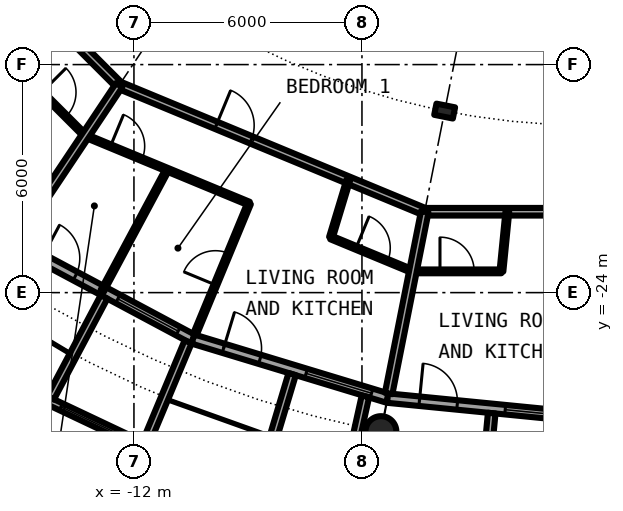
"""IFC4 building model, lengths in metres.
Left out: names, types, materials, properties, quantities, classifications, styles, units other than length and angle.
Written with IfcOpenShell. Run it as: python <this file> out.ifc"""

import sys

from ifc_helpers import new_model, si_unit, direction, frame, frame_2d, origin, origin_2d, place, context, subcontext, project, spatial, rectangle, circle, hollow_circle, i_section, extrude, element, fill, save


model = new_model("IFC4")
c1 = context("Model", 3, precision=1e-05, world=origin(), true_north=direction((0.0, 1.0)))
c2 = subcontext(c1, "Body", "Model", "MODEL_VIEW")
j1 = project(units=[si_unit("LENGTHUNIT", "METRE"), si_unit("PLANEANGLEUNIT", "RADIAN")], contexts=[c1])
p1 = place(None, origin())
s1 = spatial("IfcSite", under=j1, at=p1, CompositionType="ELEMENT")
p2 = place(p1, origin())
s2 = spatial("IfcBuilding", under=s1, at=p2, CompositionType="ELEMENT")
p3 = place(p2, frame((0.0, 0.0, 170.75)))
s3 = spatial("IfcBuildingStorey", under=s2, at=p3, CompositionType="ELEMENT", Elevation=170.75)
p4 = place(p3, frame((-5.501, -27.658, 0.0), z_axis=(0.0, 0.0, 1.0), x_axis=(1.0, 0.0, 0.0)))
e1 = element("IfcColumn", 1, at=p4, inside=s3, PredefinedType="COLUMN", context=c2, shape_type="SweptSolid", body=[
    extrude(hollow_circle(Radius=0.406, WallThickness=0.04, at=origin_2d()), origin(), (0.0, 0.0, 1.0), 3.05),
])
p5 = place(p3, frame((-3.824, -19.223, 0.0), z_axis=(0.0, 0.0, 1.0), x_axis=(-0.195090322016, -0.980785280403, 0.0)))
e2 = element("IfcColumn", 2, at=p5, inside=s3, PredefinedType="COLUMN", context=c2, shape_type="SweptSolid", body=[
    extrude(i_section(OverallWidth=0.3, OverallDepth=0.5, WebThickness=0.014, FlangeThickness=0.028, FilletRadius=0.027, at=origin_2d()), origin(), (0.0, 0.0, 1.0), 3.05),
])
p6 = place(p3, frame((-15.167, -22.699, 0.0), z_axis=(0.0, 0.0, 1.0), x_axis=(0.881915646801, -0.471407246368, 0.0)))
e3 = element("IfcWall", 3, at=p6, inside=s3, PredefinedType="SOLIDWALL", context=c2, shape_type="SweptSolid", body=[
    extrude(rectangle(XDim=5.352, YDim=0.25, at=frame_2d((2.676, 0.0))), origin(), (0.0, 0.0, 1.0), 2.7),
])
p7 = place(p6, frame((0.841, 0.0, 0.0)))
e4 = element("IfcOpeningElement", 4, at=p7, cuts=e3, PredefinedType="OPENING", context=c2, shape_type="SweptSolid", body=[
    extrude(rectangle(XDim=1.0, YDim=2.2, at=frame_2d((0.5, 1.1))), frame((0.0, 0.135, 0.0), z_axis=(0.0, -1.0, 0.0), x_axis=(1.0, 0.0, 0.0)), (0.0, 0.0, 1.0), 0.27),
])
p8 = place(p6, frame((3.111, 0.0, 0.3)))
e5 = element("IfcOpeningElement", 5, at=p8, cuts=e3, PredefinedType="OPENING", context=c2, shape_type="SweptSolid", body=[
    extrude(rectangle(XDim=1.8, YDim=2.1, at=frame_2d((0.9, 1.05))), frame((0.0, 0.135, 0.0), z_axis=(0.0, -1.0, 0.0), x_axis=(1.0, 0.0, 0.0)), (0.0, 0.0, 1.0), 0.27),
])
p9 = place(p3, frame((-14.335, -26.808, -0.03), z_axis=(0.0, 0.0, 1.0), x_axis=(0.904000060331, -0.427532327342, 0.0)))
e6 = element("IfcWall", 6, at=p9, inside=s3, PredefinedType="SOLIDWALL", context=c2, shape_type="SweptSolid", body=[
    extrude(rectangle(XDim=2.993, YDim=0.2, at=frame_2d((1.497, 0.0))), origin(), (0.0, 0.0, 1.0), 2.73),
])
p10 = place(p9, frame((0.457, 0.0, 0.33)))
e7 = element("IfcOpeningElement", 7, at=p10, cuts=e6, PredefinedType="OPENING", context=c2, shape_type="SweptSolid", body=[
    extrude(circle(Radius=1.04, at=frame_2d((1.04, 1.04))), frame((0.0, 0.11, 0.0), z_axis=(0.0, -1.0, 0.0), x_axis=(1.0, 0.0, 0.0)), (0.0, 0.0, 1.0), 0.22),
])
p11 = place(p3, frame((-12.787, -24.113, -0.03), z_axis=(0.0, 0.0, 1.0), x_axis=(-0.468365282436, -0.883534924159, 0.0)))
e8 = element("IfcWall", 8, at=p11, inside=s3, PredefinedType="SOLIDWALL", context=c2, shape_type="SweptSolid", body=[
    extrude(rectangle(XDim=3.006, YDim=0.2, at=frame_2d((1.503, 0.0))), origin(), (0.0, 0.0, 1.0), 2.73),
])
p12 = place(p3, frame((-10.575, -25.295, -0.03), z_axis=(0.0, 0.0, 1.0), x_axis=(-0.385697364644, -0.922625353492, 0.0)))
e9 = element("IfcWall", 9, at=p12, inside=s3, PredefinedType="SOLIDWALL", context=c2, shape_type="SweptSolid", body=[
    extrude(rectangle(XDim=2.883, YDim=0.2, at=frame_2d((1.442, 0.0))), origin(), (0.0, 0.0, 1.0), 2.73),
])
p13 = place(p3, frame((-10.447, -25.222, 0.0), z_axis=(0.0, 0.0, 1.0), x_axis=(0.956965678721, -0.290201119486, 0.0)))
e10 = element("IfcWall", 10, at=p13, inside=s3, PredefinedType="SOLIDWALL", context=c2, shape_type="SweptSolid", body=[
    extrude(rectangle(XDim=5.351, YDim=0.25, at=frame_2d((2.676, 0.0))), origin(), (0.0, 0.0, 1.0), 2.7),
])
p14 = place(p13, frame((0.841, 0.0, 0.0)))
e11 = element("IfcOpeningElement", 11, at=p14, cuts=e10, PredefinedType="OPENING", context=c2, shape_type="SweptSolid", body=[
    extrude(rectangle(XDim=1.0, YDim=2.2, at=frame_2d((0.5, 1.1))), frame((0.0, 0.135, 0.0), z_axis=(0.0, -1.0, 0.0), x_axis=(1.0, 0.0, 0.0)), (0.0, 0.0, 1.0), 0.27),
])
p15 = place(p13, frame((3.111, 0.0, 0.3)))
e12 = element("IfcOpeningElement", 12, at=p15, cuts=e10, PredefinedType="OPENING", context=c2, shape_type="SweptSolid", body=[
    extrude(rectangle(XDim=1.8, YDim=2.1, at=frame_2d((0.9, 1.05))), frame((0.0, 0.135, 0.0), z_axis=(0.0, -1.0, 0.0), x_axis=(1.0, 0.0, 0.0)), (0.0, 0.0, 1.0), 0.27),
])
p16 = place(p3, frame((-7.837, -26.144, -0.03), z_axis=(0.0, 0.0, 1.0), x_axis=(-0.287064767992, -0.957911174889, 0.0)))
e13 = element("IfcWall", 13, at=p16, inside=s3, PredefinedType="SOLIDWALL", context=c2, shape_type="SweptSolid", body=[
    extrude(rectangle(XDim=3.006, YDim=0.2, at=frame_2d((1.503, 0.0))), origin(), (0.0, 0.0, 1.0), 2.73),
])
p17 = place(p3, frame((-5.909, -26.729, -0.03), z_axis=(0.0, 0.0, 1.0), x_axis=(-0.216409053917, -0.976302781612, 0.0)))
e14 = element("IfcWall", 14, at=p17, inside=s3, PredefinedType="SOLIDWALL", context=c2, shape_type="SweptSolid", body=[
    extrude(rectangle(XDim=2.925, YDim=0.2, at=frame_2d((1.463, 0.0))), origin(), (0.0, 0.0, 1.0), 2.73),
])
p18 = place(p3, frame((-5.326, -26.775, 0.0), z_axis=(0.0, 0.0, 1.0), x_axis=(0.995173996315, -0.098126026407, 0.0)))
e15 = element("IfcWall", 15, at=p18, inside=s3, PredefinedType="SOLIDWALL", context=c2, shape_type="SweptSolid", body=[
    extrude(rectangle(XDim=5.352, YDim=0.25, at=frame_2d((2.676, 0.0))), origin(), (0.0, 0.0, 1.0), 2.7),
])
p19 = place(p18, frame((0.841, 0.0, 0.0)))
e16 = element("IfcOpeningElement", 16, at=p19, cuts=e15, PredefinedType="OPENING", context=c2, shape_type="SweptSolid", body=[
    extrude(rectangle(XDim=1.0, YDim=2.2, at=frame_2d((0.5, 1.1))), frame((0.0, 0.135, 0.0), z_axis=(0.0, -1.0, 0.0), x_axis=(1.0, 0.0, 0.0)), (0.0, 0.0, 1.0), 0.27),
])
p20 = place(p18, frame((3.111, 0.0, 0.3)))
e17 = element("IfcOpeningElement", 17, at=p20, cuts=e15, PredefinedType="OPENING", context=c2, shape_type="SweptSolid", body=[
    extrude(rectangle(XDim=1.8, YDim=2.1, at=frame_2d((0.9, 1.05))), frame((0.0, 0.135, 0.0), z_axis=(0.0, -1.0, 0.0), x_axis=(1.0, 0.0, 0.0)), (0.0, 0.0, 1.0), 0.27),
])
p21 = place(p3, frame((-2.586, -27.171, -0.03), z_axis=(0.0, 0.0, 1.0), x_axis=(-0.094548432284, -0.995520262954, 0.0)))
e18 = element("IfcWall", 18, at=p21, inside=s3, PredefinedType="SOLIDWALL", context=c2, shape_type="SweptSolid", body=[
    extrude(rectangle(XDim=3.006, YDim=0.2, at=frame_2d((1.503, 0.0))), origin(), (0.0, 0.0, 1.0), 2.73),
])
p22 = place(p3, frame((-16.581, -16.571, 0.0), z_axis=(0.0, 0.0, 1.0), x_axis=(0.706923494552, -0.707290020325, 0.0)))
e19 = element("IfcWall", 19, at=p22, inside=s3, PredefinedType="PARTITIONING", context=c2, shape_type="SweptSolid", body=[
    extrude(rectangle(XDim=4.663, YDim=0.1, at=frame_2d((2.331, 0.0))), origin(), (0.0, 0.0, 1.0), 2.7),
])
p23 = place(p22, frame((3.051, 0.0, 0.0)))
e20 = element("IfcOpeningElement", 20, at=p23, cuts=e19, PredefinedType="OPENING", context=c2, shape_type="SweptSolid", body=[
    extrude(rectangle(XDim=0.9, YDim=2.3, at=frame_2d((0.45, 1.15))), frame((0.0, 0.06, 0.0), z_axis=(0.0, -1.0, 0.0), x_axis=(1.0, 0.0, 0.0)), (0.0, 0.0, 1.0), 0.12),
])
p24 = place(p3, frame((-13.278, -19.873, 0.0), z_axis=(0.0, 0.0, 1.0), x_axis=(0.923920484476, -0.38258455061, 0.0)))
e21 = element("IfcWall", 21, at=p24, inside=s3, PredefinedType="PARTITIONING", context=c2, shape_type="SweptSolid", body=[
    extrude(rectangle(XDim=4.663, YDim=0.1, at=frame_2d((2.332, 0.0))), origin(), (0.0, 0.0, 1.0), 2.7),
])
p25 = place(p24, frame((0.715, 0.0, 0.0)))
e22 = element("IfcOpeningElement", 22, at=p25, cuts=e21, PredefinedType="OPENING", context=c2, shape_type="SweptSolid", body=[
    extrude(rectangle(XDim=0.9, YDim=2.3, at=frame_2d((0.45, 1.15))), frame((0.0, 0.06, 0.0), z_axis=(0.0, -1.0, 0.0), x_axis=(1.0, 0.0, 0.0)), (0.0, 0.0, 1.0), 0.12),
])
p26 = place(p3, frame((-6.817, -22.549, 0.0), z_axis=(0.0, 0.0, 1.0), x_axis=(0.923923664861, -0.382576870068, 0.0)))
e23 = element("IfcWall", 23, at=p26, inside=s3, PredefinedType="PARTITIONING", context=c2, shape_type="SweptSolid", body=[
    extrude(rectangle(XDim=2.331, YDim=0.1, at=frame_2d((1.166, 0.0))), origin(), (0.0, 0.0, 1.0), 2.7),
])
p27 = place(p26, frame((0.716, 0.0, 0.0)))
e24 = element("IfcOpeningElement", 24, at=p27, cuts=e23, PredefinedType="OPENING", context=c2, shape_type="SweptSolid", body=[
    extrude(rectangle(XDim=0.9, YDim=2.3, at=frame_2d((0.45, 1.15))), frame((0.0, 0.06, 0.0), z_axis=(0.0, -1.0, 0.0), x_axis=(1.0, 0.0, 0.0)), (0.0, 0.0, 1.0), 0.12),
])
p28 = place(p3, frame((-4.663, -23.441, 0.0), z_axis=(0.0, 0.0, 1.0), x_axis=(1.0, 0.0, 0.0)))
e25 = element("IfcWall", 25, at=p28, inside=s3, PredefinedType="PARTITIONING", context=c2, shape_type="SweptSolid", body=[
    extrude(rectangle(XDim=2.332, YDim=0.1, at=frame_2d((1.166, 0.0))), origin(), (0.0, 0.0, 1.0), 2.7),
])
p29 = place(p28, frame((0.716, 0.0, 0.0)))
e26 = element("IfcOpeningElement", 26, at=p29, cuts=e25, PredefinedType="OPENING", context=c2, shape_type="SweptSolid", body=[
    extrude(rectangle(XDim=0.9, YDim=2.3, at=frame_2d((0.45, 1.15))), frame((0.0, 0.06, 0.0), z_axis=(0.0, -1.0, 0.0), x_axis=(1.0, 0.0, 0.0)), (0.0, 0.0, 1.0), 0.12),
])
p30 = place(p3, frame((-18.542, -12.389, 0.0), z_axis=(0.0, 0.0, 1.0), x_axis=(0.707106781187, -0.707106781187, 0.0)))
e27 = element("IfcWall", 27, at=p30, inside=s3, PredefinedType="PARTITIONING", context=c2, shape_type="SweptSolid", body=[
    extrude(rectangle(XDim=8.702, YDim=0.2, at=frame_2d((4.351, 0.0))), origin(), (0.0, 0.0, 1.0), 2.7),
])
p31 = place(p30, frame((4.938, 0.0, 0.0)))
e28 = element("IfcOpeningElement", 28, at=p31, cuts=e27, PredefinedType="OPENING", context=c2, shape_type="SweptSolid", body=[
    extrude(rectangle(XDim=1.0, YDim=2.3, at=frame_2d((0.5, 1.15))), frame((0.0, 0.11, 0.0), z_axis=(0.0, -1.0, 0.0), x_axis=(1.0, 0.0, 0.0)), (0.0, 0.0, 1.0), 0.22),
])
p32 = place(p3, frame((-12.389, -18.542, 0.0), z_axis=(0.0, 0.0, 1.0), x_axis=(0.923867858178, -0.382711615483, 0.0)))
e29 = element("IfcWall", 29, at=p32, inside=s3, PredefinedType="PARTITIONING", context=c2, shape_type="SweptSolid", body=[
    extrude(rectangle(XDim=8.709, YDim=0.2, at=frame_2d((4.354, 0.0))), origin(), (0.0, 0.0, 1.0), 2.7),
])
p33 = place(p32, frame((2.763, 0.0, 0.0)))
e30 = element("IfcOpeningElement", 30, at=p33, cuts=e29, PredefinedType="OPENING", context=c2, shape_type="SweptSolid", body=[
    extrude(rectangle(XDim=1.0, YDim=2.3, at=frame_2d((0.5, 1.15))), frame((0.0, 0.11, 0.0), z_axis=(0.0, -1.0, 0.0), x_axis=(1.0, 0.0, 0.0)), (0.0, 0.0, 1.0), 0.22),
])
p34 = place(p3, frame((-4.351, -21.872, 0.0), z_axis=(0.0, 0.0, 1.0), x_axis=(1.0, 0.0, 0.0)))
e31 = element("IfcWall", 31, at=p34, inside=s3, PredefinedType="PARTITIONING", context=c2, shape_type="SweptSolid", body=[
    extrude(rectangle(XDim=8.702, YDim=0.2, at=frame_2d((4.351, 0.0))), origin(), (0.0, 0.0, 1.0), 2.7),
])
p35 = place(p34, frame((4.939, 0.0, 0.0)))
e32 = element("IfcOpeningElement", 32, at=p35, cuts=e31, PredefinedType="OPENING", context=c2, shape_type="SweptSolid", body=[
    extrude(rectangle(XDim=1.0, YDim=2.3, at=frame_2d((0.5, 1.15))), frame((0.0, 0.11, 0.0), z_axis=(0.0, -1.0, 0.0), x_axis=(1.0, 0.0, 0.0)), (0.0, 0.0, 1.0), 0.22),
])
p36 = place(p3, frame((-6.817, -22.549, 0.0), z_axis=(0.0, 0.0, 1.0), x_axis=(0.289547780579, 0.957163561134, 0.0)))
e33 = element("IfcWall", 33, at=p36, inside=s3, PredefinedType="PARTITIONING", context=c2, shape_type="SweptSolid", body=[
    extrude(rectangle(XDim=1.578, YDim=0.1, at=frame_2d((0.789, 0.0))), origin(), (0.0, 0.0, 1.0), 2.7),
])
p37 = place(p3, frame((-15.097, -22.596, 0.0), z_axis=(0.0, 0.0, 1.0), x_axis=(0.555462686211, 0.831541462723, 0.0)))
e34 = element("IfcWall", 34, at=p37, inside=s3, PredefinedType="PARTITIONING", context=c2, shape_type="SweptSolid", body=[
    extrude(rectangle(XDim=4.875, YDim=0.2, at=frame_2d((2.438, 0.0))), origin(), (0.0, 0.0, 1.0), 2.7),
])
p38 = place(p3, frame((-12.833, -23.954, 0.0), z_axis=(0.0, 0.0, 1.0), x_axis=(0.472212052488, 0.881484984265, 0.0)))
e35 = element("IfcWall", 35, at=p38, inside=s3, PredefinedType="PARTITIONING", context=c2, shape_type="SweptSolid", body=[
    extrude(rectangle(XDim=3.619, YDim=0.1, at=frame_2d((1.81, 0.0))), origin(), (0.0, 0.0, 1.0), 2.7),
])
p39 = place(p3, frame((-10.399, -25.106, 0.0), z_axis=(0.0, 0.0, 1.0), x_axis=(0.382669377748, 0.923885353999, 0.0)))
e36 = element("IfcWall", 36, at=p39, inside=s3, PredefinedType="PARTITIONING", context=c2, shape_type="SweptSolid", body=[
    extrude(rectangle(XDim=3.734, YDim=0.1, at=frame_2d((1.867, 0.0))), origin(), (0.0, 0.0, 1.0), 2.7),
])
p40 = place(p39, frame((1.417, 0.0, 0.0)))
e37 = element("IfcOpeningElement", 37, at=p40, cuts=e36, PredefinedType="OPENING", context=c2, shape_type="SweptSolid", body=[
    extrude(rectangle(XDim=0.9, YDim=2.3, at=frame_2d((0.45, 1.15))), frame((0.0, 0.06, 0.0), z_axis=(0.0, -1.0, 0.0), x_axis=(1.0, 0.0, 0.0)), (0.0, 0.0, 1.0), 0.12),
])
p41 = place(p3, frame((-5.298, -26.654, 0.0), z_axis=(0.0, 0.0, 1.0), x_axis=(0.194931286287, 0.980816901173, 0.0)))
e38 = element("IfcWall", 38, at=p41, inside=s3, PredefinedType="PARTITIONING", context=c2, shape_type="SweptSolid", body=[
    extrude(rectangle(XDim=4.875, YDim=0.2, at=frame_2d((2.437, 0.0))), origin(), (0.0, 0.0, 1.0), 2.7),
])
p42 = place(p3, frame((-2.33, -23.441, 0.0), z_axis=(0.0, 0.0, 1.0), x_axis=(0.098951748623, 0.995092232632, 0.0)))
e39 = element("IfcWall", 39, at=p42, inside=s3, PredefinedType="PARTITIONING", context=c2, shape_type="SweptSolid", body=[
    extrude(rectangle(XDim=1.577, YDim=0.1, at=frame_2d((0.788, 0.0))), origin(), (0.0, 0.0, 1.0), 2.7),
])
p43 = place(p7, origin())
e40 = element("IfcDoor", 40, at=p43, inside=s3, OperationType="SINGLE_SWING_LEFT", PredefinedType="DOOR", context=c2, shape_type="SweptSolid", body=[
    extrude(rectangle(XDim=1.0, YDim=2.2, at=frame_2d((0.5, 1.1))), frame((0.0, 0.025, 0.0), z_axis=(0.0, -1.0, 0.0), x_axis=(1.0, 0.0, 0.0)), (0.0, 0.0, 1.0), 0.05),
])
fill(e4, e40)
p44 = place(p8, origin())
e41 = element("IfcWindow", 41, at=p44, inside=s3, PartitioningType="SINGLE_PANEL", PredefinedType="WINDOW", context=c2, shape_type="SweptSolid", body=[
    extrude(rectangle(XDim=1.8, YDim=2.1, at=frame_2d((0.9, 1.05))), frame((0.0, 0.03, 0.0), z_axis=(0.0, -1.0, 0.0), x_axis=(1.0, 0.0, 0.0)), (0.0, 0.0, 1.0), 0.06),
])
fill(e5, e41)
p45 = place(p10, origin())
e42 = element("IfcWindow", 42, at=p45, inside=s3, PartitioningType="SINGLE_PANEL", PredefinedType="WINDOW", context=c2, shape_type="SweptSolid", body=[
    extrude(circle(Radius=1.04, at=frame_2d((1.04, 1.04))), frame((0.0, 0.03, 0.0), z_axis=(0.0, -1.0, 0.0), x_axis=(1.0, 0.0, 0.0)), (0.0, 0.0, 1.0), 0.06),
])
fill(e7, e42)
p46 = place(p14, origin())
e43 = element("IfcDoor", 43, at=p46, inside=s3, OperationType="SINGLE_SWING_LEFT", PredefinedType="DOOR", context=c2, shape_type="SweptSolid", body=[
    extrude(rectangle(XDim=1.0, YDim=2.2, at=frame_2d((0.5, 1.1))), frame((0.0, 0.025, 0.0), z_axis=(0.0, -1.0, 0.0), x_axis=(1.0, 0.0, 0.0)), (0.0, 0.0, 1.0), 0.05),
])
fill(e11, e43)
p47 = place(p15, origin())
e44 = element("IfcWindow", 44, at=p47, inside=s3, PartitioningType="SINGLE_PANEL", PredefinedType="WINDOW", context=c2, shape_type="SweptSolid", body=[
    extrude(rectangle(XDim=1.8, YDim=2.1, at=frame_2d((0.9, 1.05))), frame((0.0, 0.03, 0.0), z_axis=(0.0, -1.0, 0.0), x_axis=(1.0, 0.0, 0.0)), (0.0, 0.0, 1.0), 0.06),
])
fill(e12, e44)
p48 = place(p19, origin())
e45 = element("IfcDoor", 45, at=p48, inside=s3, OperationType="SINGLE_SWING_LEFT", PredefinedType="DOOR", context=c2, shape_type="SweptSolid", body=[
    extrude(rectangle(XDim=1.0, YDim=2.2, at=frame_2d((0.5, 1.1))), frame((0.0, 0.025, 0.0), z_axis=(0.0, -1.0, 0.0), x_axis=(1.0, 0.0, 0.0)), (0.0, 0.0, 1.0), 0.05),
])
fill(e16, e45)
p49 = place(p20, origin())
e46 = element("IfcWindow", 46, at=p49, inside=s3, PartitioningType="SINGLE_PANEL", PredefinedType="WINDOW", context=c2, shape_type="SweptSolid", body=[
    extrude(rectangle(XDim=1.8, YDim=2.1, at=frame_2d((0.9, 1.05))), frame((0.0, 0.03, 0.0), z_axis=(0.0, -1.0, 0.0), x_axis=(1.0, 0.0, 0.0)), (0.0, 0.0, 1.0), 0.06),
])
fill(e17, e46)
p50 = place(p23, origin())
e47 = element("IfcDoor", 47, at=p50, inside=s3, OperationType="SINGLE_SWING_RIGHT", PredefinedType="DOOR", context=c2, shape_type="SweptSolid", body=[
    extrude(rectangle(XDim=0.9, YDim=2.3, at=frame_2d((0.45, 1.15))), frame((0.0, 0.025, 0.0), z_axis=(0.0, -1.0, 0.0), x_axis=(1.0, 0.0, 0.0)), (0.0, 0.0, 1.0), 0.05),
])
fill(e20, e47)
p51 = place(p33, origin())
e48 = element("IfcDoor", 48, at=p51, inside=s3, OperationType="SINGLE_SWING_LEFT", PredefinedType="DOOR", context=c2, shape_type="SweptSolid", body=[
    extrude(rectangle(XDim=1.0, YDim=2.3, at=frame_2d((0.5, 1.15))), frame((0.0, 0.025, 0.0), z_axis=(0.0, -1.0, 0.0), x_axis=(1.0, 0.0, 0.0)), (0.0, 0.0, 1.0), 0.05),
])
fill(e30, e48)
p52 = place(p27, origin())
e49 = element("IfcDoor", 49, at=p52, inside=s3, OperationType="SINGLE_SWING_LEFT", PredefinedType="DOOR", context=c2, shape_type="SweptSolid", body=[
    extrude(rectangle(XDim=0.9, YDim=2.3, at=frame_2d((0.45, 1.15))), frame((0.0, 0.025, 0.0), z_axis=(0.0, -1.0, 0.0), x_axis=(1.0, 0.0, 0.0)), (0.0, 0.0, 1.0), 0.05),
])
fill(e24, e49)
p53 = place(p40, origin())
e50 = element("IfcDoor", 50, at=p53, inside=s3, OperationType="SINGLE_SWING_RIGHT", PredefinedType="DOOR", context=c2, shape_type="SweptSolid", body=[
    extrude(rectangle(XDim=0.9, YDim=2.3, at=frame_2d((0.45, 1.15))), frame((0.0, 0.025, 0.0), z_axis=(0.0, -1.0, 0.0), x_axis=(1.0, 0.0, 0.0)), (0.0, 0.0, 1.0), 0.05),
])
fill(e37, e50)
p54 = place(p25, origin())
e51 = element("IfcDoor", 51, at=p54, inside=s3, OperationType="SINGLE_SWING_LEFT", PredefinedType="DOOR", context=c2, shape_type="SweptSolid", body=[
    extrude(rectangle(XDim=0.9, YDim=2.3, at=frame_2d((0.45, 1.15))), frame((0.0, 0.025, 0.0), z_axis=(0.0, -1.0, 0.0), x_axis=(1.0, 0.0, 0.0)), (0.0, 0.0, 1.0), 0.05),
])
fill(e22, e51)
p55 = place(p29, origin())
e52 = element("IfcDoor", 52, at=p55, inside=s3, OperationType="SINGLE_SWING_RIGHT", PredefinedType="DOOR", context=c2, shape_type="SweptSolid", body=[
    extrude(rectangle(XDim=0.9, YDim=2.3, at=frame_2d((0.45, 1.15))), frame((0.0, 0.025, 0.0), z_axis=(0.0, -1.0, 0.0), x_axis=(1.0, 0.0, 0.0)), (0.0, 0.0, 1.0), 0.05),
])
fill(e26, e52)
save(model, sys.argv[1])
